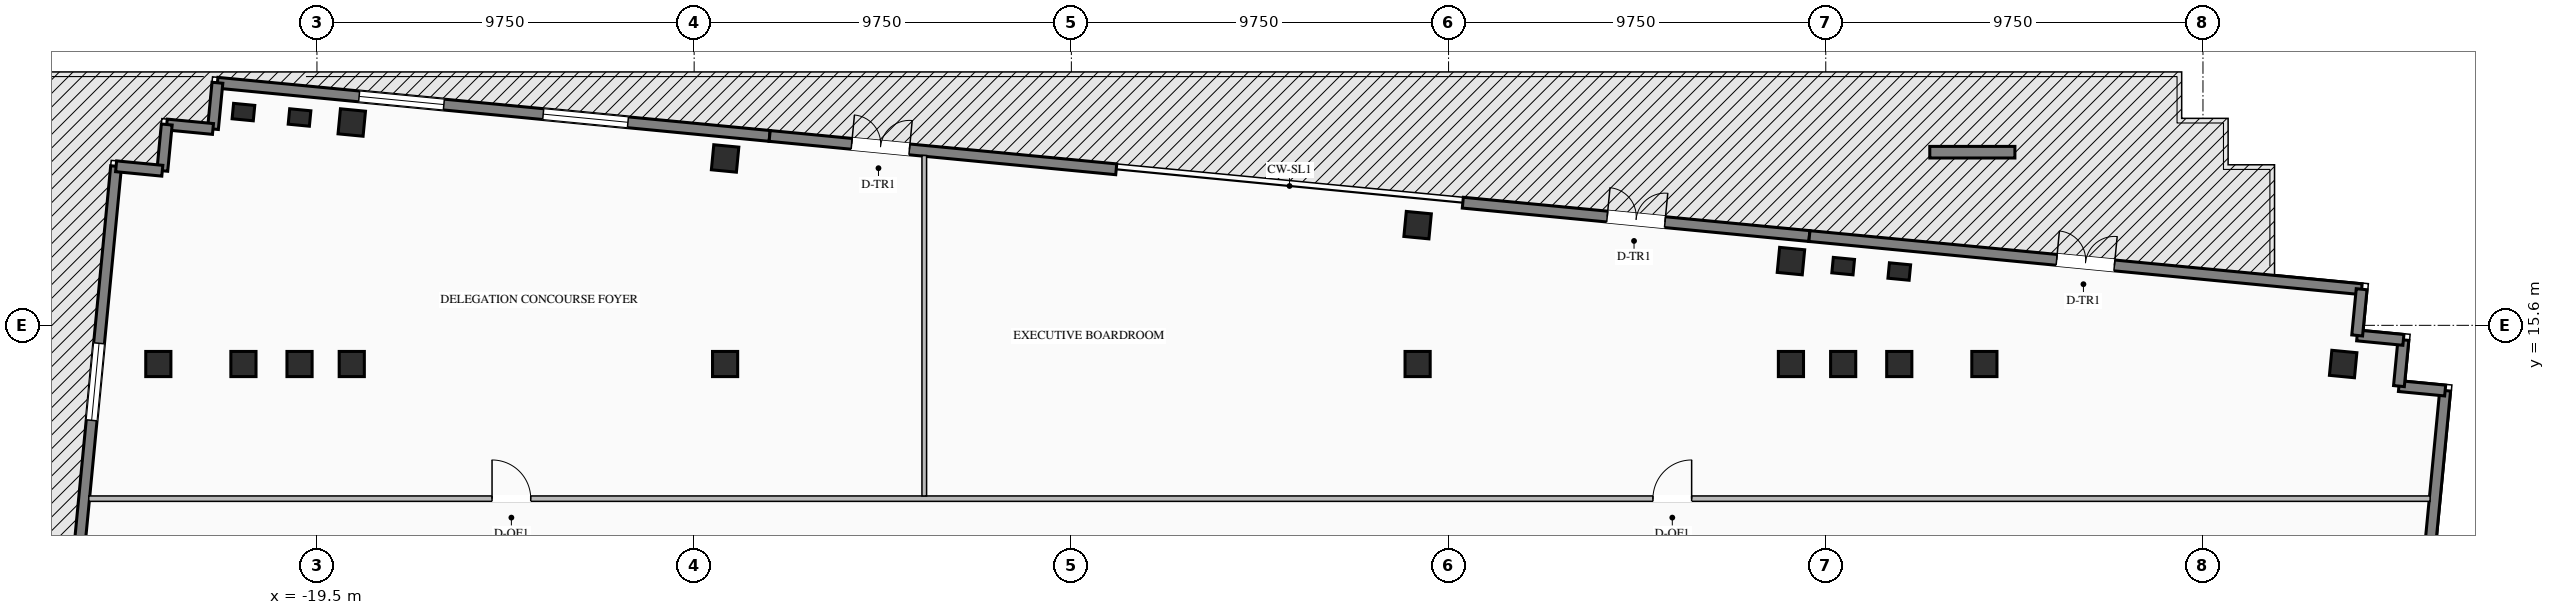
"""IFC4 building model, lengths in metres.
Left out: names, types, materials, properties, quantities, classifications, styles, units other than length and angle.
Written with IfcOpenShell. Run it as: python <this file> out.ifc"""

import sys

from ifc_helpers import new_model, si_unit, direction, frame, frame_2d, origin, origin_2d, place, context, subcontext, project, spatial, rectangle, i_section, extrude, element, fill, save


model = new_model("IFC4")
c1 = context("Model", 3, precision=1e-05, world=origin(), true_north=direction((0.0, 1.0)))
c2 = subcontext(c1, "Body", "Model", "MODEL_VIEW")
j1 = project(units=[si_unit("LENGTHUNIT", "METRE"), si_unit("PLANEANGLEUNIT", "RADIAN")], contexts=[c1])
p1 = place(None, origin())
s1 = spatial("IfcSite", under=j1, at=p1, CompositionType="ELEMENT")
p2 = place(p1, origin())
s2 = spatial("IfcBuilding", under=s1, at=p2, CompositionType="ELEMENT")
p3 = place(p2, frame((0.0, 0.0, 156.2)))
s3 = spatial("IfcBuildingStorey", under=s2, at=p3, CompositionType="ELEMENT", Elevation=156.2)
for number, where, z_axis, x_axis in (
    (1, (-21.4, 14.6, 0.0), (0.0, 0.0, 1.0), (1.0, 0.0, 0.0)),
    (2, (-19.95, 14.6, 0.0), (0.0, 0.0, 1.0), (1.0, 0.0, 0.0)),
    (3, (-18.6, 14.6, 0.0), (0.0, 0.0, 1.0), (1.0, 0.0, 0.0)),
    (4, (-8.95, 14.6, 0.0), (0.0, 0.0, 1.0), (1.0, 0.0, 0.0)),
    (5, (8.95, 14.6, 0.0), (0.0, 0.0, 1.0), (1.0, 0.0, 0.0)),
    (6, (18.6, 14.6, 0.0), (0.0, 0.0, 1.0), (1.0, 0.0, 0.0)),
    (7, (19.95, 14.6, 0.0), (0.0, 0.0, 1.0), (1.0, 0.0, 0.0)),
    (8, (21.4, 14.6, 0.0), (0.0, 0.0, 1.0), (1.0, 0.0, 0.0)),
    (9, (-23.6, 14.6, 0.0), (0.0, 0.0, 1.0), (1.0, 0.0, 0.0)),
    (10, (23.6, 14.6, 0.0), (0.0, 0.0, 1.0), (1.0, 0.0, 0.0)),
    (11, (-18.6, 20.842, 0.0), (0.0, 0.0, 1.0), (0.995, -0.096, 0.0)),
):
    element("IfcColumn", number, at=place(p3, frame(where, z_axis=z_axis, x_axis=x_axis)), inside=s3, PredefinedType="COLUMN", context=c2, shape_type="SweptSolid", body=[
        extrude(i_section(OverallWidth=0.65, OverallDepth=0.65, WebThickness=0.028, FlangeThickness=0.04, at=origin_2d()), origin(), (0.0, 0.0, 1.0), 4.2),
    ])
for number, where, z_axis, x_axis in (
    (12, (-8.95, 19.913, -0.28), (0.0, 0.0, 1.0), (0.995, -0.096, 0.0)),
    (13, (8.95, 18.19, -0.28), (0.0, 0.0, 1.0), (0.995, -0.096, 0.0)),
    (14, (18.6, 17.26, -0.28), (0.0, 0.0, 1.0), (0.995, -0.096, 0.0)),
    (15, (32.874, 14.6, -0.28), (0.0, 0.0, 1.0), (0.995, -0.096, 0.0)),
):
    element("IfcColumn", number, at=place(p3, frame(where, z_axis=z_axis, x_axis=x_axis)), inside=s3, PredefinedType="COLUMN", context=c2, shape_type="SweptSolid", body=[
        extrude(i_section(OverallWidth=0.65, OverallDepth=0.65, WebThickness=0.028, FlangeThickness=0.04, at=origin_2d()), origin(), (0.0, 0.0, 1.0), 4.48),
    ])
for number, where, z_axis, x_axis in (
    (16, (-21.4, 21.112, 0.0), (0.0, 0.0, 1.0), (0.995, -0.096, 0.0)),
    (17, (-19.95, 20.972, 0.0), (0.0, 0.0, 1.0), (0.995, -0.096, 0.0)),
):
    element("IfcColumn", number, at=place(p3, frame(where, z_axis=z_axis, x_axis=x_axis)), inside=s3, PredefinedType="PILASTER", context=c2, shape_type="SweptSolid", body=[
        extrude(rectangle(XDim=0.55, YDim=0.4, at=origin_2d()), origin(), (0.0, 0.0, 1.0), 4.2),
    ])
for number, where, z_axis, x_axis in (
    (18, (19.95, 17.131, -0.28), (0.0, 0.0, 1.0), (0.995, -0.096, 0.0)),
    (19, (21.4, 16.991, -0.28), (0.0, 0.0, 1.0), (0.995, -0.096, 0.0)),
):
    element("IfcColumn", number, at=place(p3, frame(where, z_axis=z_axis, x_axis=x_axis)), inside=s3, PredefinedType="PILASTER", context=c2, shape_type="SweptSolid", body=[
        extrude(rectangle(XDim=0.55, YDim=0.4, at=origin_2d()), origin(), (0.0, 0.0, 1.0), 4.48),
    ])
p4 = place(p3, frame((-22.073, 21.87, 0.0), z_axis=(0.0, 0.0, 1.0), x_axis=(0.995395606285, -0.095851901334, 0.0)))
e20 = element("IfcWall", 20, at=p4, inside=s3, PredefinedType="STANDARD", context=c2, shape_type="SweptSolid", body=[
    extrude(rectangle(XDim=14.34, YDim=0.28, at=frame_2d((7.17, 0.0))), origin(), (0.0, 0.0, 1.0), 4.0),
])
p5 = place(p4, frame((3.68, 0.0, 0.76)))
e21 = element("IfcOpeningElement", 21, at=p5, cuts=e20, PredefinedType="OPENING", context=c2, shape_type="SweptSolid", body=[
    extrude(rectangle(XDim=2.2, YDim=2.25, at=frame_2d((1.1, 1.125))), frame((0.0, 0.15, 0.0), z_axis=(0.0, -1.0, 0.0), x_axis=(1.0, 0.0, 0.0)), (0.0, 0.0, 1.0), 0.3),
])
p6 = place(p4, frame((8.46, 0.0, 0.76)))
e22 = element("IfcOpeningElement", 22, at=p6, cuts=e20, PredefinedType="OPENING", context=c2, shape_type="SweptSolid", body=[
    extrude(rectangle(XDim=2.2, YDim=2.25, at=frame_2d((1.1, 1.125))), frame((0.0, 0.15, 0.0), z_axis=(0.0, -1.0, 0.0), x_axis=(1.0, 0.0, 0.0)), (0.0, 0.0, 1.0), 0.3),
])
p7 = place(p3, frame((-7.799, 20.496, 0.0), z_axis=(0.0, 0.0, 1.0), x_axis=(0.995396794462, -0.09583956164, 0.0)))
e23 = element("IfcWall", 23, at=p7, inside=s3, PredefinedType="STANDARD", context=c2, shape_type="SweptSolid", body=[
    extrude(rectangle(XDim=9.0, YDim=0.28, at=frame_2d((4.5, 0.0))), origin(), (0.0, 0.0, 1.0), 4.0),
])
p8 = place(p7, frame((2.13, 0.0, 0.0)))
e24 = element("IfcOpeningElement", 24, at=p8, cuts=e23, PredefinedType="OPENING", context=c2, shape_type="SweptSolid", body=[
    extrude(rectangle(XDim=1.5, YDim=2.15, at=frame_2d((0.75, 1.075))), frame((0.0, 0.15, 0.0), z_axis=(0.0, -1.0, 0.0), x_axis=(1.0, 0.0, 0.0)), (0.0, 0.0, 1.0), 0.3),
])
p9 = place(p3, frame((10.119, 18.77, 0.0), z_axis=(0.0, 0.0, 1.0), x_axis=(0.995396794462, -0.09583956164, 0.0)))
e25 = element("IfcWall", 25, at=p9, inside=s3, PredefinedType="STANDARD", context=c2, shape_type="SweptSolid", body=[
    extrude(rectangle(XDim=9.0, YDim=0.28, at=frame_2d((4.5, 0.0))), origin(), (0.0, 0.0, 1.0), 4.0),
])
p10 = place(p9, frame((3.75, 0.0, 0.0)))
e26 = element("IfcOpeningElement", 26, at=p10, cuts=e25, PredefinedType="OPENING", context=c2, shape_type="SweptSolid", body=[
    extrude(rectangle(XDim=1.5, YDim=2.15, at=frame_2d((0.75, 1.075))), frame((0.0, 0.15, 0.0), z_axis=(0.0, -1.0, 0.0), x_axis=(1.0, 0.0, 0.0)), (0.0, 0.0, 1.0), 0.3),
])
p11 = place(p3, frame((19.077, 17.908, 0.0), z_axis=(0.0, 0.0, 1.0), x_axis=(0.995395606285, -0.095851901334, 0.0)))
e27 = element("IfcWall", 27, at=p11, inside=s3, PredefinedType="STANDARD", context=c2, shape_type="SweptSolid", body=[
    extrude(rectangle(XDim=14.34, YDim=0.28, at=frame_2d((7.17, 0.0))), origin(), (0.0, 0.0, 1.0), 4.0),
])
p12 = place(p11, frame((6.42, 0.0, 0.0)))
e28 = element("IfcOpeningElement", 28, at=p12, cuts=e27, PredefinedType="OPENING", context=c2, shape_type="SweptSolid", body=[
    extrude(rectangle(XDim=1.5, YDim=2.15, at=frame_2d((0.75, 1.075))), frame((0.0, 0.15, 0.0), z_axis=(0.0, -1.0, 0.0), x_axis=(1.0, 0.0, 0.0)), (0.0, 0.0, 1.0), 0.3),
])
p13 = place(p3, frame((-26.301, 2.998, 0.0), z_axis=(0.0, 0.0, 1.0), x_axis=(0.095837640115, 0.99539697947, 0.0)))
e29 = element("IfcWall", 29, at=p13, inside=s3, PredefinedType="STANDARD", context=c2, shape_type="SweptSolid", body=[
    extrude(rectangle(XDim=16.79, YDim=0.28, at=frame_2d((8.395, 0.0))), origin(), (0.0, 0.0, 1.0), 4.0),
])
p14 = place(p13, frame((3.547, 0.0, 0.76)))
e30 = element("IfcOpeningElement", 30, at=p14, cuts=e29, PredefinedType="OPENING", context=c2, shape_type="SweptSolid", body=[
    extrude(rectangle(XDim=2.0, YDim=2.05, at=frame_2d((1.0, 1.025))), frame((0.0, 0.15, 0.0), z_axis=(0.0, -1.0, 0.0), x_axis=(1.0, 0.0, 0.0)), (0.0, 0.0, 1.0), 0.3),
])
p15 = place(p13, frame((10.193, 0.0, 0.76)))
e31 = element("IfcOpeningElement", 31, at=p15, cuts=e29, PredefinedType="OPENING", context=c2, shape_type="SweptSolid", body=[
    extrude(rectangle(XDim=2.0, YDim=2.05, at=frame_2d((1.0, 1.025))), frame((0.0, 0.15, 0.0), z_axis=(0.0, -1.0, 0.0), x_axis=(1.0, 0.0, 0.0)), (0.0, 0.0, 1.0), 0.3),
])
p16 = place(p3, frame((35.51, 13.914, 0.0), z_axis=(0.0, 0.0, 1.0), x_axis=(-0.095839027265, -0.995396845913, 0.0)))
e32 = element("IfcWall", 32, at=p16, inside=s3, PredefinedType="STANDARD", context=c2, shape_type="SweptSolid", body=[
    extrude(rectangle(XDim=16.79, YDim=0.28, at=frame_2d((8.395, 0.0))), origin(), (0.0, 0.0, 1.0), 4.0),
])
p17 = place(p16, frame((5.647, 0.0, 0.76)))
e33 = element("IfcOpeningElement", 33, at=p17, cuts=e32, PredefinedType="OPENING", context=c2, shape_type="SweptSolid", body=[
    extrude(rectangle(XDim=2.0, YDim=2.05, at=frame_2d((1.0, 1.025))), frame((0.0, 0.15, 0.0), z_axis=(0.0, -1.0, 0.0), x_axis=(1.0, 0.0, 0.0)), (0.0, 0.0, 1.0), 0.3),
])
p18 = place(p16, frame((10.193, 0.0, 0.76)))
e34 = element("IfcOpeningElement", 34, at=p18, cuts=e32, PredefinedType="OPENING", context=c2, shape_type="SweptSolid", body=[
    extrude(rectangle(XDim=2.0, YDim=2.05, at=frame_2d((1.0, 1.025))), frame((0.0, 0.15, 0.0), z_axis=(0.0, -1.0, 0.0), x_axis=(1.0, 0.0, 0.0)), (0.0, 0.0, 1.0), 0.3),
])
p19 = place(p3, frame((35.51, 13.914, 0.0), z_axis=(0.0, 0.0, 1.0), x_axis=(-0.995397091755, 0.095836473879, 0.0)))
e35 = element("IfcWall", 35, at=p19, inside=s3, PredefinedType="STANDARD", context=c2, shape_type="SweptSolid", body=[
    extrude(rectangle(XDim=1.2, YDim=0.28, at=frame_2d((0.6, 0.0))), origin(), (0.0, 0.0, 1.0), 4.0),
])
for number, where, z_axis, x_axis in (
    (36, (34.316, 14.029, 0.0), (0.0, 0.0, 1.0), (0.096, 0.995, 0.0)),
    (37, (34.431, 15.224, 0.0), (0.0, 0.0, 1.0), (-0.995, 0.096, 0.0)),
):
    element("IfcWall", number, at=place(p3, frame(where, z_axis=z_axis, x_axis=x_axis)), inside=s3, PredefinedType="STANDARD", context=c2, shape_type="SweptSolid", body=[
        extrude(rectangle(XDim=1.2, YDim=0.28, at=frame_2d((0.6, 0.0))), origin(), (0.0, 0.0, 1.0), 4.0),
    ])
p20 = place(p3, frame((33.236, 15.339, 0.0), z_axis=(0.0, 0.0, 1.0), x_axis=(0.095836473879, 0.995397091755, 0.0)))
e38 = element("IfcWall", 38, at=p20, inside=s3, PredefinedType="STANDARD", context=c2, shape_type="SweptSolid", body=[
    extrude(rectangle(XDim=1.2, YDim=0.28, at=frame_2d((0.6, 0.0))), origin(), (0.0, 0.0, 1.0), 4.0),
])
for number, where, z_axis, x_axis in (
    (39, (-22.073, 21.87, 0.0), (0.0, 0.0, 1.0), (-0.096, -0.995, 0.0)),
    (40, (-22.188, 20.676, 0.0), (0.0, 0.0, 1.0), (-0.995, 0.096, 0.0)),
    (41, (-23.382, 20.791, 0.0), (0.0, 0.0, 1.0), (-0.096, -0.995, 0.0)),
    (42, (-23.497, 19.596, 0.0), (0.0, 0.0, 1.0), (-0.995, 0.096, 0.0)),
):
    element("IfcWall", number, at=place(p3, frame(where, z_axis=z_axis, x_axis=x_axis)), inside=s3, PredefinedType="STANDARD", context=c2, shape_type="SweptSolid", body=[
        extrude(rectangle(XDim=1.2, YDim=0.28, at=frame_2d((0.6, 0.0))), origin(), (0.0, 0.0, 1.0), 4.0),
    ])
p21 = place(p3, frame((22.189, 20.075, 0.0), z_axis=(0.0, 0.0, 1.0), x_axis=(1.0, 0.0, 0.0)))
e43 = element("IfcWall", 43, at=p21, inside=s3, PredefinedType="PARAPET", context=c2, shape_type="SweptSolid", body=[
    extrude(rectangle(XDim=2.2, YDim=0.3, at=frame_2d((1.1, 0.0))), origin(), (0.0, 0.0, 1.0), 0.65),
])
p22 = place(p3, frame((-25.398, 11.12, 0.0), z_axis=(0.0, 0.0, 1.0), x_axis=(1.0, 0.0, 0.0)))
e44 = element("IfcWall", 44, at=p22, inside=s3, PredefinedType="STANDARD", context=c2, shape_type="SweptSolid", body=[
    extrude(rectangle(XDim=60.519, YDim=0.14, at=frame_2d((30.259, 0.0))), origin(), (0.0, 0.0, 1.0), 4.0),
])
p23 = place(p22, frame((10.424, 0.0, 0.0)))
e45 = element("IfcOpeningElement", 45, at=p23, cuts=e44, PredefinedType="OPENING", context=c2, shape_type="SweptSolid", body=[
    extrude(rectangle(XDim=1.0, YDim=2.08, at=frame_2d((0.5, 1.04))), frame((0.0, 0.08, 0.0), z_axis=(0.0, -1.0, 0.0), x_axis=(1.0, 0.0, 0.0)), (0.0, 0.0, 1.0), 0.16),
])
p24 = place(p22, frame((40.431, 0.0, 0.0)))
e46 = element("IfcOpeningElement", 46, at=p24, cuts=e44, PredefinedType="OPENING", context=c2, shape_type="SweptSolid", body=[
    extrude(rectangle(XDim=1.0, YDim=2.08, at=frame_2d((0.5, 1.04))), frame((0.0, 0.08, 0.0), z_axis=(0.0, -1.0, 0.0), x_axis=(1.0, 0.0, 0.0)), (0.0, 0.0, 1.0), 0.16),
])
p25 = place(p3, frame((-3.802, 11.19, 0.0), z_axis=(0.0, 0.0, 1.0), x_axis=(0.0, 1.0, 0.0)))
e47 = element("IfcWall", 47, at=p25, inside=s3, PredefinedType="STANDARD", context=c2, shape_type="SweptSolid", body=[
    extrude(rectangle(XDim=8.8, YDim=0.12, at=frame_2d((4.4, 0.0))), origin(), (0.0, 0.0, 1.0), 4.0),
])
p26 = place(p5, origin())
e48 = element("IfcWindow", 48, at=p26, inside=s3, PartitioningType="DOUBLE_PANEL_VERTICAL", PredefinedType="WINDOW", context=c2, shape_type="SweptSolid", body=[
    extrude(rectangle(XDim=2.2, YDim=2.25, at=frame_2d((1.1, 1.125))), frame((0.0, 0.03, 0.0), z_axis=(0.0, -1.0, 0.0), x_axis=(1.0, 0.0, 0.0)), (0.0, 0.0, 1.0), 0.06),
])
fill(e21, e48)
p27 = place(p6, origin())
e49 = element("IfcWindow", 49, at=p27, inside=s3, PartitioningType="DOUBLE_PANEL_VERTICAL", PredefinedType="WINDOW", context=c2, shape_type="SweptSolid", body=[
    extrude(rectangle(XDim=2.2, YDim=2.25, at=frame_2d((1.1, 1.125))), frame((0.0, 0.03, 0.0), z_axis=(0.0, -1.0, 0.0), x_axis=(1.0, 0.0, 0.0)), (0.0, 0.0, 1.0), 0.06),
])
fill(e22, e49)
p28 = place(p8, origin())
e50 = element("IfcDoor", 50, at=p28, inside=s3, OperationType="DOUBLE_DOOR_SINGLE_SWING", PredefinedType="DOOR", context=c2, shape_type="SweptSolid", body=[
    extrude(rectangle(XDim=1.5, YDim=2.15, at=frame_2d((0.75, 1.075))), frame((0.0, 0.025, 0.0), z_axis=(0.0, -1.0, 0.0), x_axis=(1.0, 0.0, 0.0)), (0.0, 0.0, 1.0), 0.05),
])
fill(e24, e50)
p29 = place(p10, origin())
e51 = element("IfcDoor", 51, at=p29, inside=s3, OperationType="DOUBLE_DOOR_SINGLE_SWING", PredefinedType="DOOR", context=c2, shape_type="SweptSolid", body=[
    extrude(rectangle(XDim=1.5, YDim=2.15, at=frame_2d((0.75, 1.075))), frame((0.0, 0.025, 0.0), z_axis=(0.0, -1.0, 0.0), x_axis=(1.0, 0.0, 0.0)), (0.0, 0.0, 1.0), 0.05),
])
fill(e26, e51)
p30 = place(p12, origin())
e52 = element("IfcDoor", 52, at=p30, inside=s3, OperationType="DOUBLE_DOOR_SINGLE_SWING", PredefinedType="DOOR", context=c2, shape_type="SweptSolid", body=[
    extrude(rectangle(XDim=1.5, YDim=2.15, at=frame_2d((0.75, 1.075))), frame((0.0, 0.025, 0.0), z_axis=(0.0, -1.0, 0.0), x_axis=(1.0, 0.0, 0.0)), (0.0, 0.0, 1.0), 0.05),
])
fill(e28, e52)
p31 = place(p15, origin())
e53 = element("IfcWindow", 53, at=p31, inside=s3, PartitioningType="DOUBLE_PANEL_VERTICAL", PredefinedType="WINDOW", context=c2, shape_type="SweptSolid", body=[
    extrude(rectangle(XDim=2.0, YDim=2.05, at=frame_2d((1.0, 1.025))), frame((0.0, 0.03, 0.0), z_axis=(0.0, -1.0, 0.0), x_axis=(1.0, 0.0, 0.0)), (0.0, 0.0, 1.0), 0.06),
])
fill(e31, e53)
p32 = place(p23, origin())
e54 = element("IfcDoor", 54, at=p32, inside=s3, OperationType="SINGLE_SWING_LEFT", PredefinedType="DOOR", context=c2, shape_type="SweptSolid", body=[
    extrude(rectangle(XDim=1.0, YDim=2.08, at=frame_2d((0.5, 1.04))), frame((0.0, 0.025, 0.0), z_axis=(0.0, -1.0, 0.0), x_axis=(1.0, 0.0, 0.0)), (0.0, 0.0, 1.0), 0.05),
])
fill(e45, e54)
p33 = place(p24, origin())
e55 = element("IfcDoor", 55, at=p33, inside=s3, OperationType="SINGLE_SWING_RIGHT", PredefinedType="DOOR", context=c2, shape_type="SweptSolid", body=[
    extrude(rectangle(XDim=1.0, YDim=2.08, at=frame_2d((0.5, 1.04))), frame((0.0, 0.025, 0.0), z_axis=(0.0, -1.0, 0.0), x_axis=(1.0, 0.0, 0.0)), (0.0, 0.0, 1.0), 0.05),
])
fill(e46, e55)
save(model, sys.argv[1])
